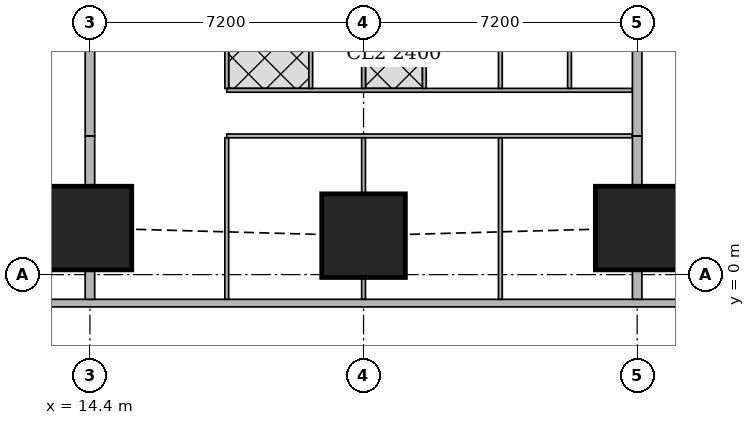
"""IFC4 building model, lengths in metres.
Left out: names, types, materials, properties, quantities, classifications, styles, units other than length and angle.
Written with IfcOpenShell. Run it as: python <this file> out.ifc"""

import sys

from ifc_helpers import new_model, si_unit, direction, frame, frame_2d, origin, origin_2d, place, context, subcontext, project, spatial, rectangle, extrude, element, fill, save


model = new_model("IFC4")
c1 = context("Model", 3, precision=1e-05, world=origin(), true_north=direction((0.0, 1.0)))
c2 = subcontext(c1, "Body", "Model", "MODEL_VIEW")
j1 = project(units=[si_unit("LENGTHUNIT", "METRE"), si_unit("PLANEANGLEUNIT", "RADIAN")], contexts=[c1])
p1 = place(None, origin())
s1 = spatial("IfcSite", under=j1, at=p1, CompositionType="ELEMENT")
p2 = place(p1, origin())
s2 = spatial("IfcBuilding", under=s1, at=p2, CompositionType="ELEMENT")
p3 = place(p2, frame((0.0, 0.0, 81.65)))
s3 = spatial("IfcBuildingStorey", under=s2, at=p3, CompositionType="ELEMENT", Elevation=81.65)
for number, where, z_axis, x_axis in (
    (1, (14.4, 1.225, 0.0), (0.0, 0.0, 1.0), (1.0, 0.0, 0.0)),
    (2, (21.6, 1.025, 0.0), (0.0, 0.0, 1.0), (1.0, 0.0, 0.0)),
    (3, (28.8, 1.225, 0.0), (0.0, 0.0, 1.0), (1.0, 0.0, 0.0)),
):
    element("IfcColumn", number, at=place(p3, frame(where, z_axis=z_axis, x_axis=x_axis)), inside=s3, PredefinedType="COLUMN", context=c2, shape_type="SweptSolid", body=[
        extrude(rectangle(XDim=2.2, YDim=2.2, at=origin_2d()), origin(), (0.0, 0.0, 1.0), 3.75),
    ])
p4 = place(p3, frame((2.163, -0.75, 0.0), z_axis=(0.0, 0.0, 1.0), x_axis=(1.0, 0.0, 0.0)))
e4 = element("IfcWall", 4, at=p4, inside=s3, PredefinedType="SOLIDWALL", context=c2, shape_type="SweptSolid", body=[
    extrude(rectangle(XDim=45.628, YDim=0.2, at=frame_2d((22.814, 0.0))), origin(), (0.0, 0.0, 1.0), 3.5),
])
p5 = place(p4, frame((9.537, 0.0, 0.9)))
e5 = element("IfcOpeningElement", 5, at=p5, cuts=e4, PredefinedType="OPENING", context=c2, shape_type="SweptSolid", body=[
    extrude(rectangle(XDim=1.8, YDim=1.5, at=frame_2d((0.9, 0.75))), frame((0.0, 0.11, 0.0), z_axis=(0.0, -1.0, 0.0), x_axis=(1.0, 0.0, 0.0)), (0.0, 0.0, 1.0), 0.22),
])
p6 = place(p4, frame((13.137, 0.0, 0.9)))
e6 = element("IfcOpeningElement", 6, at=p6, cuts=e4, PredefinedType="OPENING", context=c2, shape_type="SweptSolid", body=[
    extrude(rectangle(XDim=1.8, YDim=1.5, at=frame_2d((0.9, 0.75))), frame((0.0, 0.11, 0.0), z_axis=(0.0, -1.0, 0.0), x_axis=(1.0, 0.0, 0.0)), (0.0, 0.0, 1.0), 0.22),
])
p7 = place(p4, frame((16.737, 0.0, 0.9)))
e7 = element("IfcOpeningElement", 7, at=p7, cuts=e4, PredefinedType="OPENING", context=c2, shape_type="SweptSolid", body=[
    extrude(rectangle(XDim=1.8, YDim=1.5, at=frame_2d((0.9, 0.75))), frame((0.0, 0.11, 0.0), z_axis=(0.0, -1.0, 0.0), x_axis=(1.0, 0.0, 0.0)), (0.0, 0.0, 1.0), 0.22),
])
p8 = place(p4, frame((20.337, 0.0, 0.9)))
e8 = element("IfcOpeningElement", 8, at=p8, cuts=e4, PredefinedType="OPENING", context=c2, shape_type="SweptSolid", body=[
    extrude(rectangle(XDim=1.8, YDim=1.5, at=frame_2d((0.9, 0.75))), frame((0.0, 0.11, 0.0), z_axis=(0.0, -1.0, 0.0), x_axis=(1.0, 0.0, 0.0)), (0.0, 0.0, 1.0), 0.22),
])
p9 = place(p4, frame((23.937, 0.0, 0.9)))
e9 = element("IfcOpeningElement", 9, at=p9, cuts=e4, PredefinedType="OPENING", context=c2, shape_type="SweptSolid", body=[
    extrude(rectangle(XDim=1.8, YDim=1.5, at=frame_2d((0.9, 0.75))), frame((0.0, 0.11, 0.0), z_axis=(0.0, -1.0, 0.0), x_axis=(1.0, 0.0, 0.0)), (0.0, 0.0, 1.0), 0.22),
])
p10 = place(p4, frame((27.537, 0.0, 0.9)))
e10 = element("IfcOpeningElement", 10, at=p10, cuts=e4, PredefinedType="OPENING", context=c2, shape_type="SweptSolid", body=[
    extrude(rectangle(XDim=1.8, YDim=1.5, at=frame_2d((0.9, 0.75))), frame((0.0, 0.11, 0.0), z_axis=(0.0, -1.0, 0.0), x_axis=(1.0, 0.0, 0.0)), (0.0, 0.0, 1.0), 0.22),
])
p11 = place(p4, frame((31.137, 0.0, 0.9)))
e11 = element("IfcOpeningElement", 11, at=p11, cuts=e4, PredefinedType="OPENING", context=c2, shape_type="SweptSolid", body=[
    extrude(rectangle(XDim=1.8, YDim=1.5, at=frame_2d((0.9, 0.75))), frame((0.0, 0.11, 0.0), z_axis=(0.0, -1.0, 0.0), x_axis=(1.0, 0.0, 0.0)), (0.0, 0.0, 1.0), 0.22),
])
p12 = place(p4, frame((34.737, 0.0, 0.9)))
e12 = element("IfcOpeningElement", 12, at=p12, cuts=e4, PredefinedType="OPENING", context=c2, shape_type="SweptSolid", body=[
    extrude(rectangle(XDim=1.8, YDim=1.5, at=frame_2d((0.9, 0.75))), frame((0.0, 0.11, 0.0), z_axis=(0.0, -1.0, 0.0), x_axis=(1.0, 0.0, 0.0)), (0.0, 0.0, 1.0), 0.22),
])
p13 = place(p3, frame((28.675, 3.65, 0.0), z_axis=(0.0, 0.0, 1.0), x_axis=(-1.0, 0.0, 0.0)))
e13 = element("IfcWall", 13, at=p13, inside=s3, PredefinedType="PARTITIONING", context=c2, shape_type="SweptSolid", body=[
    extrude(rectangle(XDim=10.675, YDim=0.1, at=frame_2d((5.337, 0.0))), origin(), (0.0, 0.0, 1.0), 3.5),
])
p14 = place(p13, frame((9.575, 0.0, 0.0)))
e14 = element("IfcOpeningElement", 14, at=p14, cuts=e13, PredefinedType="OPENING", context=c2, shape_type="SweptSolid", body=[
    extrude(rectangle(XDim=0.9, YDim=2.1, at=frame_2d((0.45, 1.05))), frame((0.0, 0.06, 0.0), z_axis=(0.0, -1.0, 0.0), x_axis=(1.0, 0.0, 0.0)), (0.0, 0.0, 1.0), 0.12),
])
p15 = place(p13, frame((5.975, 0.0, 0.0)))
e15 = element("IfcOpeningElement", 15, at=p15, cuts=e13, PredefinedType="OPENING", context=c2, shape_type="SweptSolid", body=[
    extrude(rectangle(XDim=0.9, YDim=2.1, at=frame_2d((0.45, 1.05))), frame((0.0, 0.06, 0.0), z_axis=(0.0, -1.0, 0.0), x_axis=(1.0, 0.0, 0.0)), (0.0, 0.0, 1.0), 0.12),
])
p16 = place(p13, frame((2.375, 0.0, 0.0)))
e16 = element("IfcOpeningElement", 16, at=p16, cuts=e13, PredefinedType="OPENING", context=c2, shape_type="SweptSolid", body=[
    extrude(rectangle(XDim=0.9, YDim=2.1, at=frame_2d((0.45, 1.05))), frame((0.0, 0.06, 0.0), z_axis=(0.0, -1.0, 0.0), x_axis=(1.0, 0.0, 0.0)), (0.0, 0.0, 1.0), 0.12),
])
p17 = place(p3, frame((28.675, 4.85, 0.0), z_axis=(0.0, 0.0, 1.0), x_axis=(-1.0, 0.0, 0.0)))
e17 = element("IfcWall", 17, at=p17, inside=s3, PredefinedType="PARTITIONING", context=c2, shape_type="SweptSolid", body=[
    extrude(rectangle(XDim=10.675, YDim=0.1, at=frame_2d((5.337, 0.0))), origin(), (0.0, 0.0, 1.0), 3.5),
])
p18 = place(p17, frame((9.12, 0.0, 0.0)))
e18 = element("IfcOpeningElement", 18, at=p18, cuts=e17, PredefinedType="OPENING", context=c2, shape_type="SweptSolid", body=[
    extrude(rectangle(XDim=0.9, YDim=2.1, at=frame_2d((0.45, 1.05))), frame((0.0, 0.06, 0.0), z_axis=(0.0, -1.0, 0.0), x_axis=(1.0, 0.0, 0.0)), (0.0, 0.0, 1.0), 0.12),
])
p19 = place(p17, frame((5.825, 0.0, 0.0)))
e19 = element("IfcOpeningElement", 19, at=p19, cuts=e17, PredefinedType="OPENING", context=c2, shape_type="SweptSolid", body=[
    extrude(rectangle(XDim=0.9, YDim=2.1, at=frame_2d((0.45, 1.05))), frame((0.0, 0.06, 0.0), z_axis=(0.0, -1.0, 0.0), x_axis=(1.0, 0.0, 0.0)), (0.0, 0.0, 1.0), 0.12),
])
p20 = place(p17, frame((2.115, 0.0, 0.0)))
e20 = element("IfcOpeningElement", 20, at=p20, cuts=e17, PredefinedType="OPENING", context=c2, shape_type="SweptSolid", body=[
    extrude(rectangle(XDim=0.9, YDim=2.1, at=frame_2d((0.45, 1.05))), frame((0.0, 0.06, 0.0), z_axis=(0.0, -1.0, 0.0), x_axis=(1.0, 0.0, 0.0)), (0.0, 0.0, 1.0), 0.12),
])
p21 = place(p17, frame((7.32, 0.0, 0.0)))
e21 = element("IfcOpeningElement", 21, at=p21, cuts=e17, PredefinedType="OPENING", context=c2, shape_type="SweptSolid", body=[
    extrude(rectangle(XDim=0.9, YDim=2.1, at=frame_2d((0.45, 1.05))), frame((0.0, 0.06, 0.0), z_axis=(0.0, -1.0, 0.0), x_axis=(1.0, 0.0, 0.0)), (0.0, 0.0, 1.0), 0.12),
])
p22 = place(p17, frame((4.025, 0.0, 0.0)))
e22 = element("IfcOpeningElement", 22, at=p22, cuts=e17, PredefinedType="OPENING", context=c2, shape_type="SweptSolid", body=[
    extrude(rectangle(XDim=0.9, YDim=2.1, at=frame_2d((0.45, 1.05))), frame((0.0, 0.06, 0.0), z_axis=(0.0, -1.0, 0.0), x_axis=(1.0, 0.0, 0.0)), (0.0, 0.0, 1.0), 0.12),
])
p23 = place(p17, frame((0.315, 0.0, 0.0)))
e23 = element("IfcOpeningElement", 23, at=p23, cuts=e17, PredefinedType="OPENING", context=c2, shape_type="SweptSolid", body=[
    extrude(rectangle(XDim=0.9, YDim=2.1, at=frame_2d((0.45, 1.05))), frame((0.0, 0.06, 0.0), z_axis=(0.0, -1.0, 0.0), x_axis=(1.0, 0.0, 0.0)), (0.0, 0.0, 1.0), 0.12),
])
p24 = place(p3, frame((18.0, -0.65, 0.0), z_axis=(0.0, 0.0, 1.0), x_axis=(0.0, 1.0, 0.0)))
e24 = element("IfcWall", 24, at=p24, inside=s3, PredefinedType="PARTITIONING", context=c2, shape_type="SweptSolid", body=[
    extrude(rectangle(XDim=4.25, YDim=0.1, at=frame_2d((2.125, 0.0))), origin(), (0.0, 0.0, 1.0), 2.2),
])
p25 = place(p3, frame((21.6, -0.65, 0.0), z_axis=(0.0, 0.0, 1.0), x_axis=(0.0, 1.0, 0.0)))
e25 = element("IfcWall", 25, at=p25, inside=s3, PredefinedType="PARTITIONING", context=c2, shape_type="SweptSolid", body=[
    extrude(rectangle(XDim=0.574, YDim=0.1, at=frame_2d((0.287, 0.0))), origin(), (0.0, 0.0, 1.0), 3.5),
])
p26 = place(p3, frame((21.6, 2.126, 0.0), z_axis=(0.0, 0.0, 1.0), x_axis=(0.0, 1.0, 0.0)))
e26 = element("IfcWall", 26, at=p26, inside=s3, PredefinedType="PARTITIONING", context=c2, shape_type="SweptSolid", body=[
    extrude(rectangle(XDim=1.474, YDim=0.1, at=frame_2d((0.737, 0.0))), origin(), (0.0, 0.0, 1.0), 3.5),
])
p27 = place(p3, frame((25.2, -0.65, 0.0), z_axis=(0.0, 0.0, 1.0), x_axis=(0.0, 1.0, 0.0)))
e27 = element("IfcWall", 27, at=p27, inside=s3, PredefinedType="PARTITIONING", context=c2, shape_type="SweptSolid", body=[
    extrude(rectangle(XDim=4.25, YDim=0.1, at=frame_2d((2.125, 0.0))), origin(), (0.0, 0.0, 1.0), 2.2),
])
p28 = place(p3, frame((18.0, 4.9, 0.0), z_axis=(0.0, 0.0, 1.0), x_axis=(0.0, 1.0, 0.0)))
e28 = element("IfcWall", 28, at=p28, inside=s3, PredefinedType="PARTITIONING", context=c2, shape_type="SweptSolid", body=[
    extrude(rectangle(XDim=3.275, YDim=0.1, at=frame_2d((1.638, 0.0))), origin(), (0.0, 0.0, 1.0), 3.5),
])
p29 = place(p3, frame((21.6, 4.9, 0.0), z_axis=(0.0, 0.0, 1.0), x_axis=(0.0, 1.0, 0.0)))
e29 = element("IfcWall", 29, at=p29, inside=s3, PredefinedType="PARTITIONING", context=c2, shape_type="SweptSolid", body=[
    extrude(rectangle(XDim=1.799, YDim=0.1, at=frame_2d((0.899, 0.0))), origin(), (0.0, 0.0, 1.0), 3.5),
])
for number, where, z_axis, x_axis in (
    (30, (25.2, 4.9, 0.0), (0.0, 0.0, 1.0), (0.0, 1.0, 0.0)),
    (31, (20.21, 4.9, 0.0), (0.0, 0.0, 1.0), (0.0, 1.0, 0.0)),
    (32, (23.2, 4.9, 0.0), (0.0, 0.0, 1.0), (0.0, 1.0, 0.0)),
    (33, (27.02, 4.9, 0.0), (0.0, 0.0, 1.0), (0.0, 1.0, 0.0)),
):
    element("IfcWall", number, at=place(p3, frame(where, z_axis=z_axis, x_axis=x_axis)), inside=s3, PredefinedType="PARTITIONING", context=c2, shape_type="SweptSolid", body=[
        extrude(rectangle(XDim=3.275, YDim=0.1, at=frame_2d((1.638, 0.0))), origin(), (0.0, 0.0, 1.0), 3.5),
    ])
p30 = place(p3, frame((14.4, -0.65, 0.0), z_axis=(0.0, 0.0, 1.0), x_axis=(0.0, 1.0, 0.0)))
e34 = element("IfcWall", 34, at=p30, inside=s3, PredefinedType="SOLIDWALL", context=c2, shape_type="SweptSolid", body=[
    extrude(rectangle(XDim=0.774, YDim=0.25, at=frame_2d((0.387, 0.0))), origin(), (0.0, 0.0, 1.0), 3.5),
])
p31 = place(p3, frame((14.4, 2.326, 0.0), z_axis=(0.0, 0.0, 1.0), x_axis=(0.0, 1.0, 0.0)))
e35 = element("IfcWall", 35, at=p31, inside=s3, PredefinedType="SOLIDWALL", context=c2, shape_type="SweptSolid", body=[
    extrude(rectangle(XDim=1.324, YDim=0.25, at=frame_2d((0.662, 0.0))), origin(), (0.0, 0.0, 1.0), 3.5),
])
p32 = place(p3, frame((14.4, 3.65, 0.0), z_axis=(0.0, 0.0, 1.0), x_axis=(0.0, 1.0, 0.0)))
e36 = element("IfcWall", 36, at=p32, inside=s3, PredefinedType="SOLIDWALL", context=c2, shape_type="SweptSolid", body=[
    extrude(rectangle(XDim=3.049, YDim=0.25, at=frame_2d((1.524, 0.0))), origin(), (0.0, 0.0, 1.0), 3.5),
])
p33 = place(p3, frame((28.8, -0.65, 0.0), z_axis=(0.0, 0.0, 1.0), x_axis=(0.0, 1.0, 0.0)))
e37 = element("IfcWall", 37, at=p33, inside=s3, PredefinedType="SOLIDWALL", context=c2, shape_type="SweptSolid", body=[
    extrude(rectangle(XDim=0.774, YDim=0.25, at=frame_2d((0.387, 0.0))), origin(), (0.0, 0.0, 1.0), 3.5),
])
p34 = place(p3, frame((28.8, 2.326, 0.0), z_axis=(0.0, 0.0, 1.0), x_axis=(0.0, 1.0, 0.0)))
e38 = element("IfcWall", 38, at=p34, inside=s3, PredefinedType="SOLIDWALL", context=c2, shape_type="SweptSolid", body=[
    extrude(rectangle(XDim=1.324, YDim=0.25, at=frame_2d((0.662, 0.0))), origin(), (0.0, 0.0, 1.0), 3.5),
])
p35 = place(p3, frame((28.8, 3.65, 0.0), z_axis=(0.0, 0.0, 1.0), x_axis=(0.0, 1.0, 0.0)))
e39 = element("IfcWall", 39, at=p35, inside=s3, PredefinedType="SOLIDWALL", context=c2, shape_type="SweptSolid", body=[
    extrude(rectangle(XDim=3.049, YDim=0.25, at=frame_2d((1.524, 0.0))), origin(), (0.0, 0.0, 1.0), 3.5),
])
p36 = place(p5, origin())
e40 = element("IfcWindow", 40, at=p36, inside=s3, PartitioningType="SINGLE_PANEL", PredefinedType="WINDOW", context=c2, shape_type="SweptSolid", body=[
    extrude(rectangle(XDim=1.8, YDim=1.5, at=frame_2d((0.9, 0.75))), frame((0.0, 0.03, 0.0), z_axis=(0.0, -1.0, 0.0), x_axis=(1.0, 0.0, 0.0)), (0.0, 0.0, 1.0), 0.06),
])
fill(e5, e40)
p37 = place(p6, origin())
e41 = element("IfcWindow", 41, at=p37, inside=s3, PartitioningType="SINGLE_PANEL", PredefinedType="WINDOW", context=c2, shape_type="SweptSolid", body=[
    extrude(rectangle(XDim=1.8, YDim=1.5, at=frame_2d((0.9, 0.75))), frame((0.0, 0.03, 0.0), z_axis=(0.0, -1.0, 0.0), x_axis=(1.0, 0.0, 0.0)), (0.0, 0.0, 1.0), 0.06),
])
fill(e6, e41)
p38 = place(p7, origin())
e42 = element("IfcWindow", 42, at=p38, inside=s3, PartitioningType="SINGLE_PANEL", PredefinedType="WINDOW", context=c2, shape_type="SweptSolid", body=[
    extrude(rectangle(XDim=1.8, YDim=1.5, at=frame_2d((0.9, 0.75))), frame((0.0, 0.03, 0.0), z_axis=(0.0, -1.0, 0.0), x_axis=(1.0, 0.0, 0.0)), (0.0, 0.0, 1.0), 0.06),
])
fill(e7, e42)
p39 = place(p8, origin())
e43 = element("IfcWindow", 43, at=p39, inside=s3, PartitioningType="SINGLE_PANEL", PredefinedType="WINDOW", context=c2, shape_type="SweptSolid", body=[
    extrude(rectangle(XDim=1.8, YDim=1.5, at=frame_2d((0.9, 0.75))), frame((0.0, 0.03, 0.0), z_axis=(0.0, -1.0, 0.0), x_axis=(1.0, 0.0, 0.0)), (0.0, 0.0, 1.0), 0.06),
])
fill(e8, e43)
p40 = place(p9, origin())
e44 = element("IfcWindow", 44, at=p40, inside=s3, PartitioningType="SINGLE_PANEL", PredefinedType="WINDOW", context=c2, shape_type="SweptSolid", body=[
    extrude(rectangle(XDim=1.8, YDim=1.5, at=frame_2d((0.9, 0.75))), frame((0.0, 0.03, 0.0), z_axis=(0.0, -1.0, 0.0), x_axis=(1.0, 0.0, 0.0)), (0.0, 0.0, 1.0), 0.06),
])
fill(e9, e44)
p41 = place(p10, origin())
e45 = element("IfcWindow", 45, at=p41, inside=s3, PartitioningType="SINGLE_PANEL", PredefinedType="WINDOW", context=c2, shape_type="SweptSolid", body=[
    extrude(rectangle(XDim=1.8, YDim=1.5, at=frame_2d((0.9, 0.75))), frame((0.0, 0.03, 0.0), z_axis=(0.0, -1.0, 0.0), x_axis=(1.0, 0.0, 0.0)), (0.0, 0.0, 1.0), 0.06),
])
fill(e10, e45)
p42 = place(p14, origin())
e46 = element("IfcDoor", 46, at=p42, inside=s3, OperationType="SINGLE_SWING_RIGHT", PredefinedType="DOOR", context=c2, shape_type="SweptSolid", body=[
    extrude(rectangle(XDim=0.9, YDim=2.1, at=frame_2d((0.45, 1.05))), frame((0.0, 0.025, 0.0), z_axis=(0.0, -1.0, 0.0), x_axis=(1.0, 0.0, 0.0)), (0.0, 0.0, 1.0), 0.05),
])
fill(e14, e46)
p43 = place(p15, origin())
e47 = element("IfcDoor", 47, at=p43, inside=s3, OperationType="SINGLE_SWING_RIGHT", PredefinedType="DOOR", context=c2, shape_type="SweptSolid", body=[
    extrude(rectangle(XDim=0.9, YDim=2.1, at=frame_2d((0.45, 1.05))), frame((0.0, 0.025, 0.0), z_axis=(0.0, -1.0, 0.0), x_axis=(1.0, 0.0, 0.0)), (0.0, 0.0, 1.0), 0.05),
])
fill(e15, e47)
p44 = place(p16, origin())
e48 = element("IfcDoor", 48, at=p44, inside=s3, OperationType="SINGLE_SWING_RIGHT", PredefinedType="DOOR", context=c2, shape_type="SweptSolid", body=[
    extrude(rectangle(XDim=0.9, YDim=2.1, at=frame_2d((0.45, 1.05))), frame((0.0, 0.025, 0.0), z_axis=(0.0, -1.0, 0.0), x_axis=(1.0, 0.0, 0.0)), (0.0, 0.0, 1.0), 0.05),
])
fill(e16, e48)
p45 = place(p18, origin())
e49 = element("IfcDoor", 49, at=p45, inside=s3, OperationType="SINGLE_SWING_LEFT", PredefinedType="DOOR", context=c2, shape_type="SweptSolid", body=[
    extrude(rectangle(XDim=0.9, YDim=2.1, at=frame_2d((0.45, 1.05))), frame((0.0, 0.025, 0.0), z_axis=(0.0, -1.0, 0.0), x_axis=(1.0, 0.0, 0.0)), (0.0, 0.0, 1.0), 0.05),
])
fill(e18, e49)
p46 = place(p19, origin())
e50 = element("IfcDoor", 50, at=p46, inside=s3, OperationType="SINGLE_SWING_LEFT", PredefinedType="DOOR", context=c2, shape_type="SweptSolid", body=[
    extrude(rectangle(XDim=0.9, YDim=2.1, at=frame_2d((0.45, 1.05))), frame((0.0, 0.025, 0.0), z_axis=(0.0, -1.0, 0.0), x_axis=(1.0, 0.0, 0.0)), (0.0, 0.0, 1.0), 0.05),
])
fill(e19, e50)
p47 = place(p20, origin())
e51 = element("IfcDoor", 51, at=p47, inside=s3, OperationType="SINGLE_SWING_LEFT", PredefinedType="DOOR", context=c2, shape_type="SweptSolid", body=[
    extrude(rectangle(XDim=0.9, YDim=2.1, at=frame_2d((0.45, 1.05))), frame((0.0, 0.025, 0.0), z_axis=(0.0, -1.0, 0.0), x_axis=(1.0, 0.0, 0.0)), (0.0, 0.0, 1.0), 0.05),
])
fill(e20, e51)
p48 = place(p21, origin())
e52 = element("IfcDoor", 52, at=p48, inside=s3, OperationType="SINGLE_SWING_RIGHT", PredefinedType="DOOR", context=c2, shape_type="SweptSolid", body=[
    extrude(rectangle(XDim=0.9, YDim=2.1, at=frame_2d((0.45, 1.05))), frame((0.0, 0.025, 0.0), z_axis=(0.0, -1.0, 0.0), x_axis=(1.0, 0.0, 0.0)), (0.0, 0.0, 1.0), 0.05),
])
fill(e21, e52)
p49 = place(p22, origin())
e53 = element("IfcDoor", 53, at=p49, inside=s3, OperationType="SINGLE_SWING_RIGHT", PredefinedType="DOOR", context=c2, shape_type="SweptSolid", body=[
    extrude(rectangle(XDim=0.9, YDim=2.1, at=frame_2d((0.45, 1.05))), frame((0.0, 0.025, 0.0), z_axis=(0.0, -1.0, 0.0), x_axis=(1.0, 0.0, 0.0)), (0.0, 0.0, 1.0), 0.05),
])
fill(e22, e53)
p50 = place(p23, origin())
e54 = element("IfcDoor", 54, at=p50, inside=s3, OperationType="SINGLE_SWING_RIGHT", PredefinedType="DOOR", context=c2, shape_type="SweptSolid", body=[
    extrude(rectangle(XDim=0.9, YDim=2.1, at=frame_2d((0.45, 1.05))), frame((0.0, 0.025, 0.0), z_axis=(0.0, -1.0, 0.0), x_axis=(1.0, 0.0, 0.0)), (0.0, 0.0, 1.0), 0.05),
])
fill(e23, e54)
save(model, sys.argv[1])
